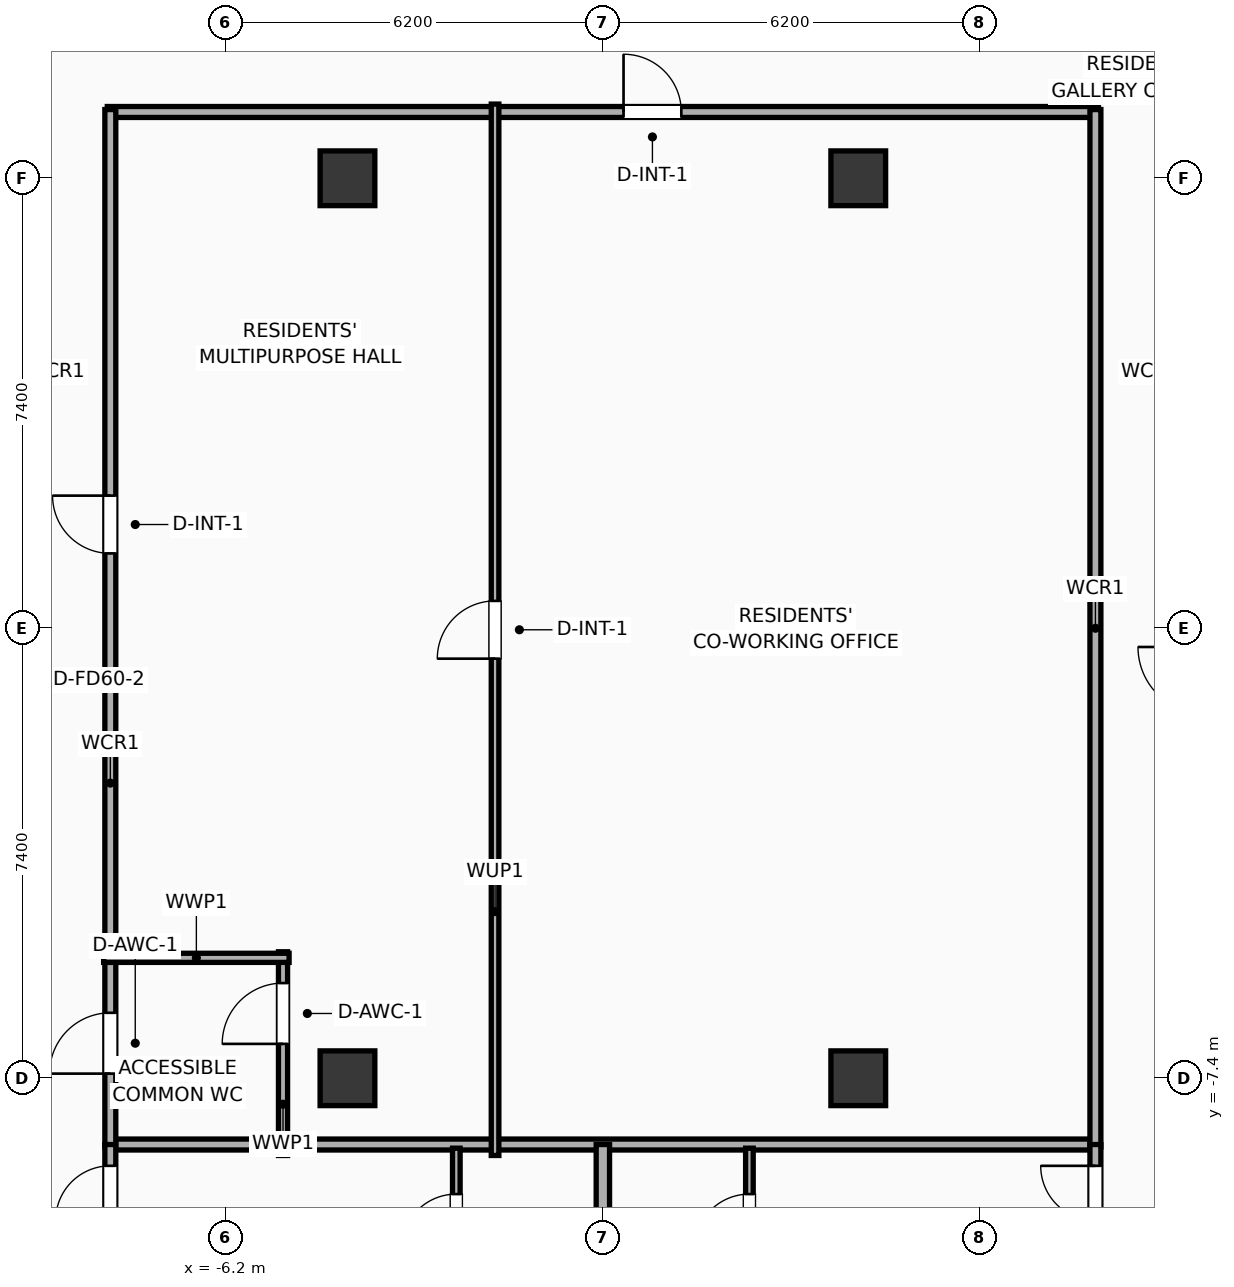
"""IFC4 building model, lengths in metres.
Left out: names, types, materials, properties, quantities, classifications, styles, units other than length and angle.
Written with IfcOpenShell. Run it as: python <this file> out.ifc"""

import sys

from ifc_helpers import new_model, si_unit, direction, frame, frame_2d, origin, origin_2d, place, context, subcontext, project, spatial, rectangle, extrude, element, fill, save


model = new_model("IFC4")
c1 = context("Model", 3, precision=1e-05, world=origin(), true_north=direction((0.0, 1.0)))
c2 = subcontext(c1, "Body", "Model", "MODEL_VIEW")
j1 = project(units=[si_unit("LENGTHUNIT", "METRE"), si_unit("PLANEANGLEUNIT", "RADIAN")], contexts=[c1])
p1 = place(None, origin())
s1 = spatial("IfcSite", under=j1, at=p1, CompositionType="ELEMENT")
p2 = place(p1, origin())
s2 = spatial("IfcBuilding", under=s1, at=p2, CompositionType="ELEMENT")
p3 = place(p2, frame((0.0, 0.0, 260.0)))
s3 = spatial("IfcBuildingStorey", under=s2, at=p3, CompositionType="ELEMENT", Elevation=260.0)
for number, where, z_axis, x_axis in (
    (1, (-4.2, -7.4, 0.0), (0.0, 0.0, 1.0), (1.0, 0.0, 0.0)),
    (2, (-4.2, 7.4, 0.0), (0.0, 0.0, 1.0), (1.0, 0.0, 0.0)),
    (3, (4.2, -7.4, 0.0), (0.0, 0.0, 1.0), (1.0, 0.0, 0.0)),
    (4, (4.2, 7.4, 0.0), (0.0, 0.0, 1.0), (1.0, 0.0, 0.0)),
):
    element("IfcColumn", number, at=place(p3, frame(where, z_axis=z_axis, x_axis=x_axis)), inside=s3, PredefinedType="COLUMN", context=c2, shape_type="SweptSolid", body=[
        extrude(rectangle(XDim=0.9, YDim=0.9, at=origin_2d()), origin(), (0.0, 0.0, 1.0), 3.9),
    ])
p4 = place(p3, frame((-8.15, 8.49, 0.0), z_axis=(0.0, 0.0, 1.0), x_axis=(1.0, 0.0, 0.0)))
e5 = element("IfcWall", 5, at=p4, inside=s3, PredefinedType="PARTITIONING", context=c2, shape_type="SweptSolid", body=[
    extrude(rectangle(XDim=16.3, YDim=0.18, at=frame_2d((8.15, 0.0))), origin(), (0.0, 0.0, 1.0), 3.65),
])
p5 = place(p4, frame((8.49, 0.0, 0.0)))
e6 = element("IfcOpeningElement", 6, at=p5, cuts=e5, PredefinedType="OPENING", context=c2, shape_type="SweptSolid", body=[
    extrude(rectangle(XDim=0.95, YDim=2.05, at=frame_2d((0.475, 1.025))), frame((0.0, 0.1, 0.0), z_axis=(0.0, -1.0, 0.0), x_axis=(1.0, 0.0, 0.0)), (0.0, 0.0, 1.0), 0.2),
])
p6 = place(p3, frame((-8.15, -8.49, 0.0), z_axis=(0.0, 0.0, 1.0), x_axis=(1.0, 0.0, 0.0)))
e7 = element("IfcWall", 7, at=p6, inside=s3, PredefinedType="PARTITIONING", context=c2, shape_type="SweptSolid", body=[
    extrude(rectangle(XDim=16.3, YDim=0.18, at=frame_2d((8.15, 0.0))), origin(), (0.0, 0.0, 1.0), 3.65),
])
p7 = place(p3, frame((-8.1, -8.53, 0.0), z_axis=(0.0, 0.0, 1.0), x_axis=(0.0, 1.0, 0.0)))
e8 = element("IfcWall", 8, at=p7, inside=s3, PredefinedType="PARTITIONING", context=c2, shape_type="SweptSolid", body=[
    extrude(rectangle(XDim=17.06, YDim=0.18, at=frame_2d((8.53, 0.0))), origin(), (0.0, 0.0, 1.0), 3.65),
])
p8 = place(p7, frame((1.206, 0.0, 0.0)))
e9 = element("IfcOpeningElement", 9, at=p8, cuts=e8, PredefinedType="OPENING", context=c2, shape_type="SweptSolid", body=[
    extrude(rectangle(XDim=1.0, YDim=2.05, at=frame_2d((0.5, 1.025))), frame((0.0, 0.1, 0.0), z_axis=(0.0, -1.0, 0.0), x_axis=(1.0, 0.0, 0.0)), (0.0, 0.0, 1.0), 0.2),
])
p9 = place(p7, frame((9.761, 0.0, 0.0)))
e10 = element("IfcOpeningElement", 10, at=p9, cuts=e8, PredefinedType="OPENING", context=c2, shape_type="SweptSolid", body=[
    extrude(rectangle(XDim=0.95, YDim=2.05, at=frame_2d((0.475, 1.025))), frame((0.0, 0.1, 0.0), z_axis=(0.0, -1.0, 0.0), x_axis=(1.0, 0.0, 0.0)), (0.0, 0.0, 1.0), 0.2),
])
p10 = place(p3, frame((8.1, -8.53, 0.0), z_axis=(0.0, 0.0, 1.0), x_axis=(0.0, 1.0, 0.0)))
e11 = element("IfcWall", 11, at=p10, inside=s3, PredefinedType="PARTITIONING", context=c2, shape_type="SweptSolid", body=[
    extrude(rectangle(XDim=17.06, YDim=0.18, at=frame_2d((8.53, 0.0))), origin(), (0.0, 0.0, 1.0), 3.65),
])
p11 = place(p3, frame((-5.26, -8.67, 0.0), z_axis=(0.0, 0.0, 1.0), x_axis=(0.0, 1.0, 0.0)))
e12 = element("IfcWall", 12, at=p11, inside=s3, PredefinedType="PLUMBINGWALL", context=c2, shape_type="SweptSolid", body=[
    extrude(rectangle(XDim=3.35, YDim=0.15, at=frame_2d((1.675, 0.0))), origin(), (0.0, 0.0, 1.0), 3.65),
])
p12 = place(p11, frame((1.835, 0.0, 0.0)))
e13 = element("IfcOpeningElement", 13, at=p12, cuts=e12, PredefinedType="OPENING", context=c2, shape_type="SweptSolid", body=[
    extrude(rectangle(XDim=1.0, YDim=2.05, at=frame_2d((0.5, 1.025))), frame((0.0, 0.085, 0.0), z_axis=(0.0, -1.0, 0.0), x_axis=(1.0, 0.0, 0.0)), (0.0, 0.0, 1.0), 0.17),
])
p13 = place(p3, frame((-8.21, -5.42, 0.0), z_axis=(0.0, 0.0, 1.0), x_axis=(1.0, 0.0, 0.0)))
e14 = element("IfcWall", 14, at=p13, inside=s3, PredefinedType="PLUMBINGWALL", context=c2, shape_type="SweptSolid", body=[
    extrude(rectangle(XDim=3.05, YDim=0.15, at=frame_2d((1.525, 0.0))), origin(), (0.0, 0.0, 1.0), 3.65),
])
p14 = place(p3, frame((-1.773, -8.67, 0.0), z_axis=(0.0, 0.0, 1.0), x_axis=(0.0, 1.0, 0.0)))
e15 = element("IfcWall", 15, at=p14, inside=s3, PredefinedType="PARTITIONING", context=c2, shape_type="SweptSolid", body=[
    extrude(rectangle(XDim=17.29, YDim=0.125, at=frame_2d((8.645, 0.0))), origin(), (0.0, 0.0, 1.0), 3.65),
])
p15 = place(p14, frame((8.17, 0.0, 0.0)))
e16 = element("IfcOpeningElement", 16, at=p15, cuts=e15, PredefinedType="OPENING", context=c2, shape_type="SweptSolid", body=[
    extrude(rectangle(XDim=0.95, YDim=2.05, at=frame_2d((0.475, 1.025))), frame((0.0, 0.073, 0.0), z_axis=(0.0, -1.0, 0.0), x_axis=(1.0, 0.0, 0.0)), (0.0, 0.0, 1.0), 0.145),
])
p16 = place(p3, frame((-2.41, -10.96, 0.0), z_axis=(0.0, 0.0, 1.0), x_axis=(0.0, 1.0, 0.0)))
e17 = element("IfcWall", 17, at=p16, inside=s3, PredefinedType="PARTITIONING", context=c2, shape_type="SweptSolid", body=[
    extrude(rectangle(XDim=2.41, YDim=0.125, at=frame_2d((1.205, 0.0))), origin(), (0.0, 0.0, 1.0), 3.65),
])
p17 = place(p16, frame((0.755, 0.0, 0.0)))
e18 = element("IfcOpeningElement", 18, at=p17, cuts=e17, PredefinedType="OPENING", context=c2, shape_type="SweptSolid", body=[
    extrude(rectangle(XDim=0.9, YDim=2.05, at=frame_2d((0.45, 1.025))), frame((0.0, 0.073, 0.0), z_axis=(0.0, -1.0, 0.0), x_axis=(1.0, 0.0, 0.0)), (0.0, 0.0, 1.0), 0.145),
])
p18 = place(p3, frame((-8.1, -18.155, 0.0), z_axis=(0.0, 0.0, 1.0), x_axis=(0.0, 1.0, 0.0)))
e19 = element("IfcWall", 19, at=p18, inside=s3, PredefinedType="PARTITIONING", context=c2, shape_type="SweptSolid", body=[
    extrude(rectangle(XDim=9.665, YDim=0.18, at=frame_2d((4.832, 0.0))), origin(), (0.0, 0.0, 1.0), 3.65),
])
p19 = place(p18, frame((8.414, 0.0, 0.0)))
e20 = element("IfcOpeningElement", 20, at=p19, cuts=e19, PredefinedType="OPENING", context=c2, shape_type="SweptSolid", body=[
    extrude(rectangle(XDim=0.9, YDim=2.05, at=frame_2d((0.45, 1.025))), frame((0.0, 0.1, 0.0), z_axis=(0.0, -1.0, 0.0), x_axis=(1.0, 0.0, 0.0)), (0.0, 0.0, 1.0), 0.2),
])
p20 = place(p3, frame((2.41, -10.96, 0.0), z_axis=(0.0, 0.0, 1.0), x_axis=(0.0, 1.0, 0.0)))
e21 = element("IfcWall", 21, at=p20, inside=s3, PredefinedType="PARTITIONING", context=c2, shape_type="SweptSolid", body=[
    extrude(rectangle(XDim=2.41, YDim=0.125, at=frame_2d((1.205, 0.0))), origin(), (0.0, 0.0, 1.0), 2.54),
])
p21 = place(p20, frame((0.755, 0.0, 0.0)))
e22 = element("IfcOpeningElement", 22, at=p21, cuts=e21, PredefinedType="OPENING", context=c2, shape_type="SweptSolid", body=[
    extrude(rectangle(XDim=0.9, YDim=2.05, at=frame_2d((0.45, 1.025))), frame((0.0, 0.073, 0.0), z_axis=(0.0, -1.0, 0.0), x_axis=(1.0, 0.0, 0.0)), (0.0, 0.0, 1.0), 0.145),
])
p22 = place(p3, frame((8.1, -19.857, 0.0), z_axis=(0.0, 0.0, 1.0), x_axis=(0.0, 1.0, 0.0)))
e23 = element("IfcWall", 23, at=p22, inside=s3, PredefinedType="PARTITIONING", context=c2, shape_type="SweptSolid", body=[
    extrude(rectangle(XDim=11.367, YDim=0.18, at=frame_2d((5.684, 0.0))), origin(), (0.0, 0.0, 1.0), 3.65),
])
p23 = place(p22, frame((10.117, 0.0, 0.0)))
e24 = element("IfcOpeningElement", 24, at=p23, cuts=e23, PredefinedType="OPENING", context=c2, shape_type="SweptSolid", body=[
    extrude(rectangle(XDim=0.9, YDim=2.05, at=frame_2d((0.45, 1.025))), frame((0.0, 0.1, 0.0), z_axis=(0.0, -1.0, 0.0), x_axis=(1.0, 0.0, 0.0)), (0.0, 0.0, 1.0), 0.2),
])
p24 = place(p3, frame((0.0, -19.006, 0.0), z_axis=(0.0, 0.0, 1.0), x_axis=(0.0, 1.0, 0.0)))
e25 = element("IfcWall", 25, at=p24, inside=s3, PredefinedType="PARTITIONING", context=c2, shape_type="SweptSolid", body=[
    extrude(rectangle(XDim=10.516, YDim=0.22, at=frame_2d((5.258, 0.0))), origin(), (0.0, 0.0, 1.0), 2.54),
])
p25 = place(p5, origin())
e26 = element("IfcDoor", 26, at=p25, inside=s3, OperationType="SINGLE_SWING_LEFT", PredefinedType="DOOR", context=c2, shape_type="SweptSolid", body=[
    extrude(rectangle(XDim=0.95, YDim=2.05, at=frame_2d((0.475, 1.025))), frame((0.0, 0.025, 0.0), z_axis=(0.0, -1.0, 0.0), x_axis=(1.0, 0.0, 0.0)), (0.0, 0.0, 1.0), 0.05),
])
fill(e6, e26)
p26 = place(p8, origin())
e27 = element("IfcDoor", 27, at=p26, inside=s3, OperationType="SINGLE_SWING_LEFT", PredefinedType="DOOR", context=c2, shape_type="SweptSolid", body=[
    extrude(rectangle(XDim=1.0, YDim=2.05, at=frame_2d((0.5, 1.025))), frame((0.0, 0.025, 0.0), z_axis=(0.0, -1.0, 0.0), x_axis=(1.0, 0.0, 0.0)), (0.0, 0.0, 1.0), 0.05),
])
fill(e9, e27)
p27 = place(p9, origin())
e28 = element("IfcDoor", 28, at=p27, inside=s3, OperationType="SINGLE_SWING_RIGHT", PredefinedType="DOOR", context=c2, shape_type="SweptSolid", body=[
    extrude(rectangle(XDim=0.95, YDim=2.05, at=frame_2d((0.475, 1.025))), frame((0.0, 0.025, 0.0), z_axis=(0.0, -1.0, 0.0), x_axis=(1.0, 0.0, 0.0)), (0.0, 0.0, 1.0), 0.05),
])
fill(e10, e28)
p28 = place(p12, origin())
e29 = element("IfcDoor", 29, at=p28, inside=s3, OperationType="SINGLE_SWING_LEFT", PredefinedType="DOOR", context=c2, shape_type="SweptSolid", body=[
    extrude(rectangle(XDim=1.0, YDim=2.05, at=frame_2d((0.5, 1.025))), frame((0.0, 0.025, 0.0), z_axis=(0.0, -1.0, 0.0), x_axis=(1.0, 0.0, 0.0)), (0.0, 0.0, 1.0), 0.05),
])
fill(e13, e29)
p29 = place(p15, origin())
e30 = element("IfcDoor", 30, at=p29, inside=s3, OperationType="SINGLE_SWING_LEFT", PredefinedType="DOOR", context=c2, shape_type="SweptSolid", body=[
    extrude(rectangle(XDim=0.95, YDim=2.05, at=frame_2d((0.475, 1.025))), frame((0.0, 0.025, 0.0), z_axis=(0.0, -1.0, 0.0), x_axis=(1.0, 0.0, 0.0)), (0.0, 0.0, 1.0), 0.05),
])
fill(e16, e30)
p30 = place(p17, origin())
e31 = element("IfcDoor", 31, at=p30, inside=s3, OperationType="SINGLE_SWING_LEFT", PredefinedType="DOOR", context=c2, shape_type="SweptSolid", body=[
    extrude(rectangle(XDim=0.9, YDim=2.05, at=frame_2d((0.45, 1.025))), frame((0.0, 0.025, 0.0), z_axis=(0.0, -1.0, 0.0), x_axis=(1.0, 0.0, 0.0)), (0.0, 0.0, 1.0), 0.05),
])
fill(e18, e31)
p31 = place(p19, origin())
e32 = element("IfcDoor", 32, at=p31, inside=s3, OperationType="SINGLE_SWING_LEFT", PredefinedType="DOOR", context=c2, shape_type="SweptSolid", body=[
    extrude(rectangle(XDim=0.9, YDim=2.05, at=frame_2d((0.45, 1.025))), frame((0.0, 0.025, 0.0), z_axis=(0.0, -1.0, 0.0), x_axis=(1.0, 0.0, 0.0)), (0.0, 0.0, 1.0), 0.05),
])
fill(e20, e32)
p32 = place(p21, origin())
e33 = element("IfcDoor", 33, at=p32, inside=s3, OperationType="SINGLE_SWING_LEFT", PredefinedType="DOOR", context=c2, shape_type="SweptSolid", body=[
    extrude(rectangle(XDim=0.9, YDim=2.05, at=frame_2d((0.45, 1.025))), frame((0.0, 0.025, 0.0), z_axis=(0.0, -1.0, 0.0), x_axis=(1.0, 0.0, 0.0)), (0.0, 0.0, 1.0), 0.05),
])
fill(e22, e33)
p33 = place(p23, origin())
e34 = element("IfcDoor", 34, at=p33, inside=s3, OperationType="SINGLE_SWING_RIGHT", PredefinedType="DOOR", context=c2, shape_type="SweptSolid", body=[
    extrude(rectangle(XDim=0.9, YDim=2.05, at=frame_2d((0.45, 1.025))), frame((0.0, 0.025, 0.0), z_axis=(0.0, -1.0, 0.0), x_axis=(1.0, 0.0, 0.0)), (0.0, 0.0, 1.0), 0.05),
])
fill(e24, e34)
save(model, sys.argv[1])
